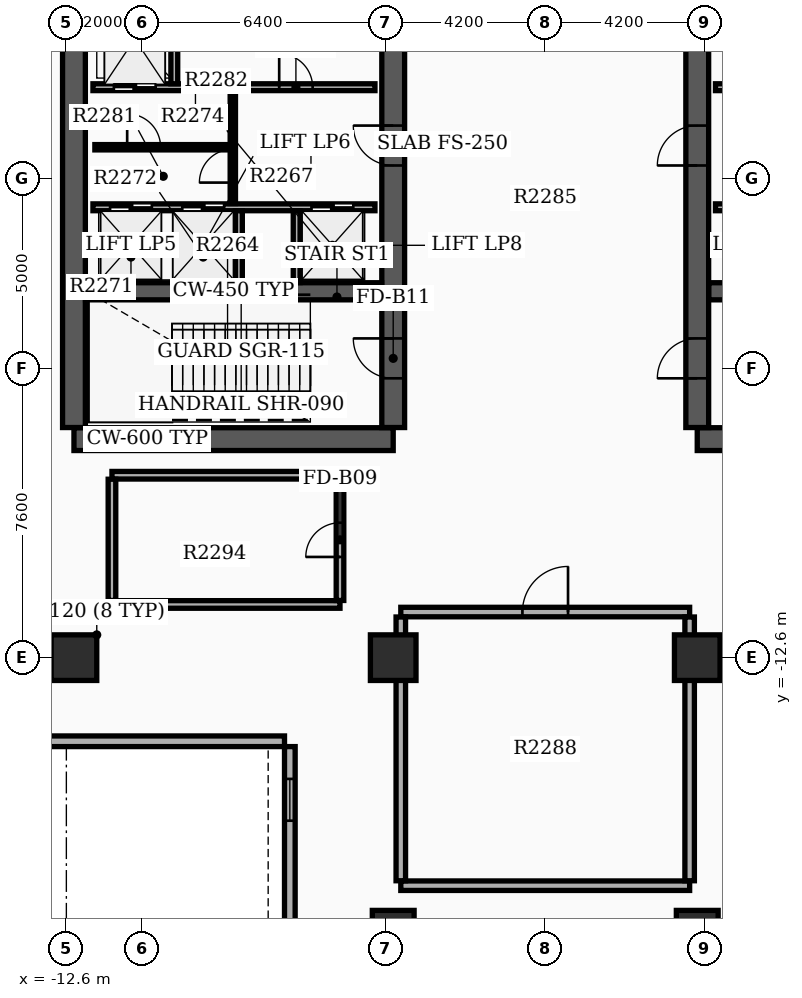
"""IFC4 building model, lengths in metres.
Left out: names, types, materials, properties, quantities, classifications, styles, units other than length and angle.
Written with IfcOpenShell. Run it as: python <this file> out.ifc"""

import sys

from ifc_helpers import new_model, si_unit, direction, frame, frame_2d, origin, origin_2d, place, context, subcontext, project, spatial, rectangle, extrude, element, fill, save


model = new_model("IFC4")
c1 = context("Model", 3, precision=1e-05, world=origin(), true_north=direction((0.0, 1.0)))
c2 = subcontext(c1, "Body", "Model", "MODEL_VIEW")
j1 = project(units=[si_unit("LENGTHUNIT", "METRE"), si_unit("PLANEANGLEUNIT", "RADIAN")], contexts=[c1])
p1 = place(None, origin())
s1 = spatial("IfcSite", under=j1, at=p1, CompositionType="ELEMENT")
p2 = place(p1, origin())
s2 = spatial("IfcBuilding", under=s1, at=p2, CompositionType="ELEMENT")
p3 = place(p2, frame((0.0, 0.0, 143.7)))
s3 = spatial("IfcBuildingStorey", under=s2, at=p3, CompositionType="ELEMENT", Elevation=143.7)
p4 = place(p3, frame((-12.4, -6.85, 0.0), z_axis=(0.0, 0.0, 1.0), x_axis=(1.0, 0.0, 0.0)))
e1 = element("IfcWall", 1, at=p4, inside=s3, PredefinedType="SHEAR", context=c2, shape_type="SweptSolid", body=[
    extrude(rectangle(XDim=8.4, YDim=0.6, at=frame_2d((4.2, 0.0))), origin(), (0.0, 0.0, 1.0), 4.9),
])
p5 = place(p3, frame((-12.4, -6.545, 0.0), z_axis=(0.0, 0.0, 1.0), x_axis=(0.0, 1.0, 0.0)))
e2 = element("IfcWall", 2, at=p5, inside=s3, PredefinedType="SHEAR", context=c2, shape_type="SweptSolid", body=[
    extrude(rectangle(XDim=11.19, YDim=0.6, at=frame_2d((5.595, 0.0))), origin(), (0.0, 0.0, 1.0), 4.9),
])
p6 = place(p3, frame((-4.0, -6.545, 0.0), z_axis=(0.0, 0.0, 1.0), x_axis=(0.0, 1.0, 0.0)))
e3 = element("IfcWall", 3, at=p6, inside=s3, PredefinedType="SHEAR", context=c2, shape_type="SweptSolid", body=[
    extrude(rectangle(XDim=11.19, YDim=0.6, at=frame_2d((5.595, 0.0))), origin(), (0.0, 0.0, 1.0), 4.9),
])
p7 = place(p6, frame((1.295, 0.0, 0.0)))
e4 = element("IfcOpeningElement", 4, at=p7, cuts=e3, PredefinedType="OPENING", context=c2, shape_type="SweptSolid", body=[
    extrude(rectangle(XDim=1.05, YDim=2.15, at=frame_2d((0.525, 1.075))), frame((0.0, 0.31, 0.0), z_axis=(0.0, -1.0, 0.0), x_axis=(1.0, 0.0, 0.0)), (0.0, 0.0, 1.0), 0.62),
])
p8 = place(p6, frame((6.895, 0.0, 0.0)))
e5 = element("IfcOpeningElement", 5, at=p8, cuts=e3, PredefinedType="OPENING", context=c2, shape_type="SweptSolid", body=[
    extrude(rectangle(XDim=1.05, YDim=2.15, at=frame_2d((0.525, 1.075))), frame((0.0, 0.31, 0.0), z_axis=(0.0, -1.0, 0.0), x_axis=(1.0, 0.0, 0.0)), (0.0, 0.0, 1.0), 0.62),
])
p9 = place(p3, frame((-12.095, -2.96, 0.0), z_axis=(0.0, 0.0, 1.0), x_axis=(1.0, 0.0, 0.0)))
e6 = element("IfcWall", 6, at=p9, inside=s3, PredefinedType="SHEAR", context=c2, shape_type="SweptSolid", body=[
    extrude(rectangle(XDim=7.79, YDim=0.45, at=frame_2d((3.895, 0.0))), origin(), (0.0, 0.0, 1.0), 4.9),
])
p10 = place(p3, frame((4.0, -6.85, 0.0), z_axis=(0.0, 0.0, 1.0), x_axis=(1.0, 0.0, 0.0)))
e7 = element("IfcWall", 7, at=p10, inside=s3, PredefinedType="SHEAR", context=c2, shape_type="SweptSolid", body=[
    extrude(rectangle(XDim=8.4, YDim=0.6, at=frame_2d((4.2, 0.0))), origin(), (0.0, 0.0, 1.0), 4.9),
])
p11 = place(p3, frame((4.0, -6.545, 0.0), z_axis=(0.0, 0.0, 1.0), x_axis=(0.0, 1.0, 0.0)))
e8 = element("IfcWall", 8, at=p11, inside=s3, PredefinedType="SHEAR", context=c2, shape_type="SweptSolid", body=[
    extrude(rectangle(XDim=11.19, YDim=0.6, at=frame_2d((5.595, 0.0))), origin(), (0.0, 0.0, 1.0), 4.9),
])
p12 = place(p11, frame((1.295, 0.0, 0.0)))
e9 = element("IfcOpeningElement", 9, at=p12, cuts=e8, PredefinedType="OPENING", context=c2, shape_type="SweptSolid", body=[
    extrude(rectangle(XDim=1.05, YDim=2.15, at=frame_2d((0.525, 1.075))), frame((0.0, 0.31, 0.0), z_axis=(0.0, -1.0, 0.0), x_axis=(1.0, 0.0, 0.0)), (0.0, 0.0, 1.0), 0.62),
])
p13 = place(p11, frame((6.895, 0.0, 0.0)))
e10 = element("IfcOpeningElement", 10, at=p13, cuts=e8, PredefinedType="OPENING", context=c2, shape_type="SweptSolid", body=[
    extrude(rectangle(XDim=1.05, YDim=2.15, at=frame_2d((0.525, 1.075))), frame((0.0, 0.31, 0.0), z_axis=(0.0, -1.0, 0.0), x_axis=(1.0, 0.0, 0.0)), (0.0, 0.0, 1.0), 0.62),
])
p14 = place(p3, frame((4.305, -2.96, 0.0), z_axis=(0.0, 0.0, 1.0), x_axis=(1.0, 0.0, 0.0)))
e11 = element("IfcWall", 11, at=p14, inside=s3, PredefinedType="SHEAR", context=c2, shape_type="SweptSolid", body=[
    extrude(rectangle(XDim=7.79, YDim=0.45, at=frame_2d((3.895, 0.0))), origin(), (0.0, 0.0, 1.0), 4.9),
])
for number, where, z_axis, x_axis in (
    (12, (-12.4, -12.6, 0.0), (0.0, 0.0, 1.0), (1.0, 0.0, 0.0)),
    (13, (-4.0, -12.6, 0.0), (0.0, 0.0, 1.0), (1.0, 0.0, 0.0)),
    (14, (4.0, -12.6, 0.0), (0.0, 0.0, 1.0), (1.0, 0.0, 0.0)),
):
    element("IfcColumn", number, at=place(p3, frame(where, z_axis=z_axis, x_axis=x_axis)), inside=s3, PredefinedType="COLUMN", context=c2, shape_type="SweptSolid", body=[
        extrude(rectangle(XDim=1.2, YDim=1.2, at=origin_2d()), origin(), (0.0, 0.0, 1.0), 5.1),
    ])
for number, where, z_axis, x_axis in (
    (15, (-4.0, -19.8, 0.0), (0.0, 0.0, 1.0), (1.0, 0.0, 0.0)),
    (16, (4.0, -19.8, 0.0), (0.0, 0.0, 1.0), (1.0, 0.0, 0.0)),
):
    element("IfcColumn", number, at=place(p3, frame(where, z_axis=z_axis, x_axis=x_axis)), inside=s3, PredefinedType="COLUMN", context=c2, shape_type="SweptSolid", body=[
        extrude(rectangle(XDim=1.1, YDim=1.1, at=origin_2d()), origin(), (0.0, 0.0, 1.0), 5.1),
    ])
p15 = place(p3, frame((-6.72, -14.94, 0.0), z_axis=(0.0, 0.0, 1.0), x_axis=(0.0, -1.0, 0.0)))
e17 = element("IfcWall", 17, at=p15, inside=s3, PredefinedType="STANDARD", context=c2, shape_type="SweptSolid", body=[
    extrude(rectangle(XDim=20.1, YDim=0.28, at=frame_2d((10.05, 0.0))), origin(), (0.0, 0.0, 1.0), 3.98),
])
p16 = place(p15, frame((0.85, 0.0, 0.95)))
e18 = element("IfcOpeningElement", 18, at=p16, cuts=e17, PredefinedType="OPENING", context=c2, shape_type="SweptSolid", body=[
    extrude(rectangle(XDim=1.1, YDim=1.2, at=frame_2d((0.55, 0.6))), frame((0.0, 0.15, 0.0), z_axis=(0.0, -1.0, 0.0), x_axis=(1.0, 0.0, 0.0)), (0.0, 0.0, 1.0), 0.3),
])
p17 = place(p3, frame((-13.16, -14.8, 0.0), z_axis=(0.0, 0.0, 1.0), x_axis=(1.0, 0.0, 0.0)))
e19 = element("IfcWall", 19, at=p17, inside=s3, PredefinedType="STANDARD", context=c2, shape_type="SweptSolid", body=[
    extrude(rectangle(XDim=6.3, YDim=0.28, at=frame_2d((3.15, 0.0))), origin(), (0.0, 0.0, 1.0), 3.98),
])
p18 = place(p3, frame((-11.9, 2.41, 0.0), z_axis=(0.0, 0.0, 1.0), x_axis=(1.0, 0.0, 0.0)))
e20 = element("IfcWall", 20, at=p18, inside=s3, PredefinedType="SOLIDWALL", context=c2, shape_type="SweptSolid", body=[
    extrude(rectangle(XDim=7.42, YDim=0.18, at=frame_2d((3.71, 0.0))), origin(), (0.0, 0.0, 1.0), 3.97),
])
p19 = place(p18, frame((0.55, 0.0, 0.0)))
e21 = element("IfcOpeningElement", 21, at=p19, cuts=e20, PredefinedType="OPENING", context=c2, shape_type="SweptSolid", body=[
    extrude(rectangle(XDim=1.1, YDim=2.15, at=frame_2d((0.55, 1.075))), frame((0.0, 0.1, 0.0), z_axis=(0.0, -1.0, 0.0), x_axis=(1.0, 0.0, 0.0)), (0.0, 0.0, 1.0), 0.2),
])
p20 = place(p18, frame((4.9, 0.0, 0.0)))
e22 = element("IfcOpeningElement", 22, at=p20, cuts=e20, PredefinedType="OPENING", context=c2, shape_type="SweptSolid", body=[
    extrude(rectangle(XDim=0.88, YDim=2.1, at=frame_2d((0.44, 1.05))), frame((0.0, 0.1, 0.0), z_axis=(0.0, -1.0, 0.0), x_axis=(1.0, 0.0, 0.0)), (0.0, 0.0, 1.0), 0.2),
])
p21 = place(p3, frame((4.48, 2.41, 0.0), z_axis=(0.0, 0.0, 1.0), x_axis=(1.0, 0.0, 0.0)))
e23 = element("IfcWall", 23, at=p21, inside=s3, PredefinedType="SOLIDWALL", context=c2, shape_type="SweptSolid", body=[
    extrude(rectangle(XDim=7.42, YDim=0.18, at=frame_2d((3.71, 0.0))), origin(), (0.0, 0.0, 1.0), 3.97),
])
p22 = place(p21, frame((5.67, 0.0, 0.0)))
e24 = element("IfcOpeningElement", 24, at=p22, cuts=e23, PredefinedType="OPENING", context=c2, shape_type="SweptSolid", body=[
    extrude(rectangle(XDim=1.1, YDim=2.15, at=frame_2d((0.55, 1.075))), frame((0.0, 0.1, 0.0), z_axis=(0.0, -1.0, 0.0), x_axis=(1.0, 0.0, 0.0)), (0.0, 0.0, 1.0), 0.2),
])
p23 = place(p21, frame((1.6, 0.0, 0.0)))
e25 = element("IfcOpeningElement", 25, at=p23, cuts=e23, PredefinedType="OPENING", context=c2, shape_type="SweptSolid", body=[
    extrude(rectangle(XDim=0.88, YDim=2.1, at=frame_2d((0.44, 1.05))), frame((0.0, 0.1, 0.0), z_axis=(0.0, -1.0, 0.0), x_axis=(1.0, 0.0, 0.0)), (0.0, 0.0, 1.0), 0.2),
])
p24 = place(p3, frame((-11.9, -0.75, 0.0), z_axis=(0.0, 0.0, 1.0), x_axis=(1.0, 0.0, 0.0)))
e26 = element("IfcWall", 26, at=p24, inside=s3, PredefinedType="SOLIDWALL", context=c2, shape_type="SweptSolid", body=[
    extrude(rectangle(XDim=7.42, YDim=0.18, at=frame_2d((3.71, 0.0))), origin(), (0.0, 0.0, 1.0), 3.97),
])
p25 = place(p24, frame((0.45, 0.0, 0.0)))
e27 = element("IfcOpeningElement", 27, at=p25, cuts=e26, PredefinedType="OPENING", context=c2, shape_type="SweptSolid", body=[
    extrude(rectangle(XDim=1.1, YDim=2.15, at=frame_2d((0.55, 1.075))), frame((0.0, 0.1, 0.0), z_axis=(0.0, -1.0, 0.0), x_axis=(1.0, 0.0, 0.0)), (0.0, 0.0, 1.0), 0.2),
])
p26 = place(p24, frame((2.35, 0.0, 0.0)))
e28 = element("IfcOpeningElement", 28, at=p26, cuts=e26, PredefinedType="OPENING", context=c2, shape_type="SweptSolid", body=[
    extrude(rectangle(XDim=1.1, YDim=2.15, at=frame_2d((0.55, 1.075))), frame((0.0, 0.1, 0.0), z_axis=(0.0, -1.0, 0.0), x_axis=(1.0, 0.0, 0.0)), (0.0, 0.0, 1.0), 0.2),
])
p27 = place(p24, frame((5.75, 0.0, 0.0)))
e29 = element("IfcOpeningElement", 29, at=p27, cuts=e26, PredefinedType="OPENING", context=c2, shape_type="SweptSolid", body=[
    extrude(rectangle(XDim=1.1, YDim=2.15, at=frame_2d((0.55, 1.075))), frame((0.0, 0.1, 0.0), z_axis=(0.0, -1.0, 0.0), x_axis=(1.0, 0.0, 0.0)), (0.0, 0.0, 1.0), 0.2),
])
p28 = place(p3, frame((4.48, -0.75, 0.0), z_axis=(0.0, 0.0, 1.0), x_axis=(1.0, 0.0, 0.0)))
e30 = element("IfcWall", 30, at=p28, inside=s3, PredefinedType="SOLIDWALL", context=c2, shape_type="SweptSolid", body=[
    extrude(rectangle(XDim=7.42, YDim=0.18, at=frame_2d((3.71, 0.0))), origin(), (0.0, 0.0, 1.0), 3.97),
])
p29 = place(p28, frame((0.52, 0.0, 0.0)))
e31 = element("IfcOpeningElement", 31, at=p29, cuts=e30, PredefinedType="OPENING", context=c2, shape_type="SweptSolid", body=[
    extrude(rectangle(XDim=1.1, YDim=2.15, at=frame_2d((0.55, 1.075))), frame((0.0, 0.1, 0.0), z_axis=(0.0, -1.0, 0.0), x_axis=(1.0, 0.0, 0.0)), (0.0, 0.0, 1.0), 0.2),
])
p30 = place(p28, frame((3.92, 0.0, 0.0)))
e32 = element("IfcOpeningElement", 32, at=p30, cuts=e30, PredefinedType="OPENING", context=c2, shape_type="SweptSolid", body=[
    extrude(rectangle(XDim=1.1, YDim=2.15, at=frame_2d((0.55, 1.075))), frame((0.0, 0.1, 0.0), z_axis=(0.0, -1.0, 0.0), x_axis=(1.0, 0.0, 0.0)), (0.0, 0.0, 1.0), 0.2),
])
p31 = place(p28, frame((5.82, 0.0, 0.0)))
e33 = element("IfcOpeningElement", 33, at=p31, cuts=e30, PredefinedType="OPENING", context=c2, shape_type="SweptSolid", body=[
    extrude(rectangle(XDim=1.1, YDim=2.15, at=frame_2d((0.55, 1.075))), frame((0.0, 0.1, 0.0), z_axis=(0.0, -1.0, 0.0), x_axis=(1.0, 0.0, 0.0)), (0.0, 0.0, 1.0), 0.2),
])
p32 = place(p3, frame((-9.76, 2.5, 0.0), z_axis=(0.0, 0.0, 1.0), x_axis=(0.0, 1.0, 0.0)))
e34 = element("IfcWall", 34, at=p32, inside=s3, PredefinedType="SOLIDWALL", context=c2, shape_type="SweptSolid", body=[
    extrude(rectangle(XDim=1.99, YDim=0.18, at=frame_2d((0.995, 0.0))), origin(), (0.0, 0.0, 1.0), 3.97),
])
for number, where, z_axis, x_axis in (
    (35, (-8.06, -2.73, 0.0), (0.0, 0.0, 1.0), (0.0, 1.0, 0.0)),
    (36, (-6.54, -2.73, 0.0), (0.0, 0.0, 1.0), (0.0, 1.0, 0.0)),
):
    element("IfcWall", number, at=place(p3, frame(where, z_axis=z_axis, x_axis=x_axis)), inside=s3, PredefinedType="SOLIDWALL", context=c2, shape_type="SweptSolid", body=[
        extrude(rectangle(XDim=1.89, YDim=0.18, at=frame_2d((0.945, 0.0))), origin(), (0.0, 0.0, 1.0), 3.97),
    ])
p33 = place(p3, frame((-8.22, -0.65, 0.0), z_axis=(0.0, 0.0, 1.0), x_axis=(0.0, 1.0, 0.0)))
e37 = element("IfcWall", 37, at=p33, inside=s3, PredefinedType="SOLIDWALL", context=c2, shape_type="SweptSolid", body=[
    extrude(rectangle(XDim=2.96, YDim=0.14, at=frame_2d((1.48, 0.0))), origin(), (0.0, 0.0, 1.0), 3.97),
])
p34 = place(p33, frame((0.55, 0.0, 0.0)))
e38 = element("IfcOpeningElement", 38, at=p34, cuts=e37, PredefinedType="OPENING", context=c2, shape_type="SweptSolid", body=[
    extrude(rectangle(XDim=0.88, YDim=2.1, at=frame_2d((0.44, 1.05))), frame((0.0, 0.08, 0.0), z_axis=(0.0, -1.0, 0.0), x_axis=(1.0, 0.0, 0.0)), (0.0, 0.0, 1.0), 0.16),
])
p35 = place(p3, frame((-11.85, 0.83, 0.0), z_axis=(0.0, 0.0, 1.0), x_axis=(1.0, 0.0, 0.0)))
e39 = element("IfcWall", 39, at=p35, inside=s3, PredefinedType="PARTITIONING", context=c2, shape_type="SweptSolid", body=[
    extrude(rectangle(XDim=3.552, YDim=0.14, at=frame_2d((1.776, 0.0))), origin(), (0.0, 0.0, 1.0), 3.97),
])
p36 = place(p35, frame((0.85, 0.0, 0.0)))
e40 = element("IfcOpeningElement", 40, at=p36, cuts=e39, PredefinedType="OPENING", context=c2, shape_type="SweptSolid", body=[
    extrude(rectangle(XDim=0.88, YDim=2.1, at=frame_2d((0.44, 1.05))), frame((0.0, 0.08, 0.0), z_axis=(0.0, -1.0, 0.0), x_axis=(1.0, 0.0, 0.0)), (0.0, 0.0, 1.0), 0.16),
])
p37 = place(p3, frame((-3.8, -18.6, 0.0), z_axis=(0.0, 0.0, 1.0), x_axis=(1.0, 0.0, 0.0)))
e41 = element("IfcWall", 41, at=p37, inside=s3, PredefinedType="SOLIDWALL", context=c2, shape_type="SweptSolid", body=[
    extrude(rectangle(XDim=7.6, YDim=0.25, at=frame_2d((3.8, 0.0))), origin(), (0.0, 0.0, 1.0), 3.97),
])
p38 = place(p3, frame((-3.8, -11.4, 0.0), z_axis=(0.0, 0.0, 1.0), x_axis=(1.0, 0.0, 0.0)))
e42 = element("IfcWall", 42, at=p38, inside=s3, PredefinedType="SOLIDWALL", context=c2, shape_type="SweptSolid", body=[
    extrude(rectangle(XDim=7.6, YDim=0.25, at=frame_2d((3.8, 0.0))), origin(), (0.0, 0.0, 1.0), 3.97),
])
p39 = place(p38, frame((3.2, 0.0, 0.0)))
e43 = element("IfcOpeningElement", 43, at=p39, cuts=e42, PredefinedType="OPENING", context=c2, shape_type="SweptSolid", body=[
    extrude(rectangle(XDim=1.2, YDim=2.15, at=frame_2d((0.6, 1.075))), frame((0.0, 0.135, 0.0), z_axis=(0.0, -1.0, 0.0), x_axis=(1.0, 0.0, 0.0)), (0.0, 0.0, 1.0), 0.27),
])
for number, where, z_axis, x_axis in (
    (44, (-3.8, -18.47, 0.0), (0.0, 0.0, 1.0), (0.0, 1.0, 0.0)),
    (45, (3.8, -18.47, 0.0), (0.0, 0.0, 1.0), (0.0, 1.0, 0.0)),
):
    element("IfcWall", number, at=place(p3, frame(where, z_axis=z_axis, x_axis=x_axis)), inside=s3, PredefinedType="SOLIDWALL", context=c2, shape_type="SweptSolid", body=[
        extrude(rectangle(XDim=6.94, YDim=0.25, at=frame_2d((3.47, 0.0))), origin(), (0.0, 0.0, 1.0), 3.97),
    ])
for number, where, z_axis, x_axis in (
    (46, (-11.4, -11.2, 0.0), (0.0, 0.0, 1.0), (1.0, 0.0, 0.0)),
    (47, (-11.4, -7.8, 0.0), (0.0, 0.0, 1.0), (1.0, 0.0, 0.0)),
):
    element("IfcWall", number, at=place(p3, frame(where, z_axis=z_axis, x_axis=x_axis)), inside=s3, PredefinedType="PARTITIONING", context=c2, shape_type="SweptSolid", body=[
        extrude(rectangle(XDim=6.0, YDim=0.2, at=frame_2d((3.0, 0.0))), origin(), (0.0, 0.0, 1.0), 3.97),
    ])
p40 = place(p3, frame((-11.4, -11.095, 0.0), z_axis=(0.0, 0.0, 1.0), x_axis=(0.0, 1.0, 0.0)))
e48 = element("IfcWall", 48, at=p40, inside=s3, PredefinedType="PARTITIONING", context=c2, shape_type="SweptSolid", body=[
    extrude(rectangle(XDim=3.19, YDim=0.2, at=frame_2d((1.595, 0.0))), origin(), (0.0, 0.0, 1.0), 3.97),
])
p41 = place(p3, frame((-5.4, -11.095, 0.0), z_axis=(0.0, 0.0, 1.0), x_axis=(0.0, 1.0, 0.0)))
e49 = element("IfcWall", 49, at=p41, inside=s3, PredefinedType="PARTITIONING", context=c2, shape_type="SweptSolid", body=[
    extrude(rectangle(XDim=3.19, YDim=0.2, at=frame_2d((1.595, 0.0))), origin(), (0.0, 0.0, 1.0), 3.97),
])
p42 = place(p41, frame((1.145, 0.0, 0.0)))
e50 = element("IfcOpeningElement", 50, at=p42, cuts=e49, PredefinedType="OPENING", context=c2, shape_type="SweptSolid", body=[
    extrude(rectangle(XDim=0.9, YDim=2.15, at=frame_2d((0.45, 1.075))), frame((0.0, 0.11, 0.0), z_axis=(0.0, -1.0, 0.0), x_axis=(1.0, 0.0, 0.0)), (0.0, 0.0, 1.0), 0.22),
])
p43 = place(p16, origin())
e51 = element("IfcWindow", 51, at=p43, inside=s3, PartitioningType="SINGLE_PANEL", PredefinedType="WINDOW", context=c2, shape_type="SweptSolid", body=[
    extrude(rectangle(XDim=1.1, YDim=1.2, at=frame_2d((0.55, 0.6))), frame((0.0, 0.03, 0.0), z_axis=(0.0, -1.0, 0.0), x_axis=(1.0, 0.0, 0.0)), (0.0, 0.0, 1.0), 0.06),
])
fill(e18, e51)
p44 = place(p7, origin())
e52 = element("IfcDoor", 52, at=p44, inside=s3, OperationType="SINGLE_SWING_RIGHT", PredefinedType="DOOR", context=c2, shape_type="SweptSolid", body=[
    extrude(rectangle(XDim=1.05, YDim=2.15, at=frame_2d((0.525, 1.075))), frame((0.0, 0.025, 0.0), z_axis=(0.0, -1.0, 0.0), x_axis=(1.0, 0.0, 0.0)), (0.0, 0.0, 1.0), 0.05),
])
fill(e4, e52)
p45 = place(p12, origin())
e53 = element("IfcDoor", 53, at=p45, inside=s3, OperationType="SINGLE_SWING_LEFT", PredefinedType="DOOR", context=c2, shape_type="SweptSolid", body=[
    extrude(rectangle(XDim=1.05, YDim=2.15, at=frame_2d((0.525, 1.075))), frame((0.0, 0.025, 0.0), z_axis=(0.0, -1.0, 0.0), x_axis=(1.0, 0.0, 0.0)), (0.0, 0.0, 1.0), 0.05),
])
fill(e9, e53)
p46 = place(p8, origin())
e54 = element("IfcDoor", 54, at=p46, inside=s3, OperationType="SINGLE_SWING_RIGHT", PredefinedType="DOOR", context=c2, shape_type="SweptSolid", body=[
    extrude(rectangle(XDim=1.05, YDim=2.15, at=frame_2d((0.525, 1.075))), frame((0.0, 0.025, 0.0), z_axis=(0.0, -1.0, 0.0), x_axis=(1.0, 0.0, 0.0)), (0.0, 0.0, 1.0), 0.05),
])
fill(e5, e54)
p47 = place(p13, origin())
e55 = element("IfcDoor", 55, at=p47, inside=s3, OperationType="SINGLE_SWING_LEFT", PredefinedType="DOOR", context=c2, shape_type="SweptSolid", body=[
    extrude(rectangle(XDim=1.05, YDim=2.15, at=frame_2d((0.525, 1.075))), frame((0.0, 0.025, 0.0), z_axis=(0.0, -1.0, 0.0), x_axis=(1.0, 0.0, 0.0)), (0.0, 0.0, 1.0), 0.05),
])
fill(e10, e55)
p48 = place(p19, origin())
e56 = element("IfcDoor", 56, at=p48, inside=s3, OperationType="DOUBLE_DOOR_SLIDING", PredefinedType="DOOR", context=c2, shape_type="SweptSolid", body=[
    extrude(rectangle(XDim=1.1, YDim=2.15, at=frame_2d((0.55, 1.075))), frame((0.0, 0.025, 0.0), z_axis=(0.0, -1.0, 0.0), x_axis=(1.0, 0.0, 0.0)), (0.0, 0.0, 1.0), 0.05),
])
fill(e21, e56)
p49 = place(p25, origin())
e57 = element("IfcDoor", 57, at=p49, inside=s3, OperationType="DOUBLE_DOOR_SLIDING", PredefinedType="DOOR", context=c2, shape_type="SweptSolid", body=[
    extrude(rectangle(XDim=1.1, YDim=2.15, at=frame_2d((0.55, 1.075))), frame((0.0, 0.025, 0.0), z_axis=(0.0, -1.0, 0.0), x_axis=(1.0, 0.0, 0.0)), (0.0, 0.0, 1.0), 0.05),
])
fill(e27, e57)
p50 = place(p26, origin())
e58 = element("IfcDoor", 58, at=p50, inside=s3, OperationType="DOUBLE_DOOR_SLIDING", PredefinedType="DOOR", context=c2, shape_type="SweptSolid", body=[
    extrude(rectangle(XDim=1.1, YDim=2.15, at=frame_2d((0.55, 1.075))), frame((0.0, 0.025, 0.0), z_axis=(0.0, -1.0, 0.0), x_axis=(1.0, 0.0, 0.0)), (0.0, 0.0, 1.0), 0.05),
])
fill(e28, e58)
p51 = place(p27, origin())
e59 = element("IfcDoor", 59, at=p51, inside=s3, OperationType="DOUBLE_DOOR_SLIDING", PredefinedType="DOOR", context=c2, shape_type="SweptSolid", body=[
    extrude(rectangle(XDim=1.1, YDim=2.15, at=frame_2d((0.55, 1.075))), frame((0.0, 0.025, 0.0), z_axis=(0.0, -1.0, 0.0), x_axis=(1.0, 0.0, 0.0)), (0.0, 0.0, 1.0), 0.05),
])
fill(e29, e59)
p52 = place(p20, origin())
e60 = element("IfcDoor", 60, at=p52, inside=s3, OperationType="SINGLE_SWING_LEFT", PredefinedType="DOOR", context=c2, shape_type="SweptSolid", body=[
    extrude(rectangle(XDim=0.88, YDim=2.1, at=frame_2d((0.44, 1.05))), frame((0.0, 0.025, 0.0), z_axis=(0.0, -1.0, 0.0), x_axis=(1.0, 0.0, 0.0)), (0.0, 0.0, 1.0), 0.05),
])
fill(e22, e60)
p53 = place(p34, origin())
e61 = element("IfcDoor", 61, at=p53, inside=s3, OperationType="SINGLE_SWING_LEFT", PredefinedType="DOOR", context=c2, shape_type="SweptSolid", body=[
    extrude(rectangle(XDim=0.88, YDim=2.1, at=frame_2d((0.44, 1.05))), frame((0.0, 0.025, 0.0), z_axis=(0.0, -1.0, 0.0), x_axis=(1.0, 0.0, 0.0)), (0.0, 0.0, 1.0), 0.05),
])
fill(e38, e61)
p54 = place(p36, origin())
e62 = element("IfcDoor", 62, at=p54, inside=s3, OperationType="SINGLE_SWING_LEFT", PredefinedType="DOOR", context=c2, shape_type="SweptSolid", body=[
    extrude(rectangle(XDim=0.88, YDim=2.1, at=frame_2d((0.44, 1.05))), frame((0.0, 0.025, 0.0), z_axis=(0.0, -1.0, 0.0), x_axis=(1.0, 0.0, 0.0)), (0.0, 0.0, 1.0), 0.05),
])
fill(e40, e62)
p55 = place(p39, origin())
e63 = element("IfcDoor", 63, at=p55, inside=s3, OperationType="SINGLE_SWING_RIGHT", PredefinedType="DOOR", context=c2, shape_type="SweptSolid", body=[
    extrude(rectangle(XDim=1.2, YDim=2.15, at=frame_2d((0.6, 1.075))), frame((0.0, 0.025, 0.0), z_axis=(0.0, -1.0, 0.0), x_axis=(1.0, 0.0, 0.0)), (0.0, 0.0, 1.0), 0.05),
])
fill(e43, e63)
p56 = place(p42, origin())
e64 = element("IfcDoor", 64, at=p56, inside=s3, OperationType="SINGLE_SWING_LEFT", PredefinedType="DOOR", context=c2, shape_type="SweptSolid", body=[
    extrude(rectangle(XDim=0.9, YDim=2.15, at=frame_2d((0.45, 1.075))), frame((0.0, 0.025, 0.0), z_axis=(0.0, -1.0, 0.0), x_axis=(1.0, 0.0, 0.0)), (0.0, 0.0, 1.0), 0.05),
])
fill(e50, e64)
save(model, sys.argv[1])
